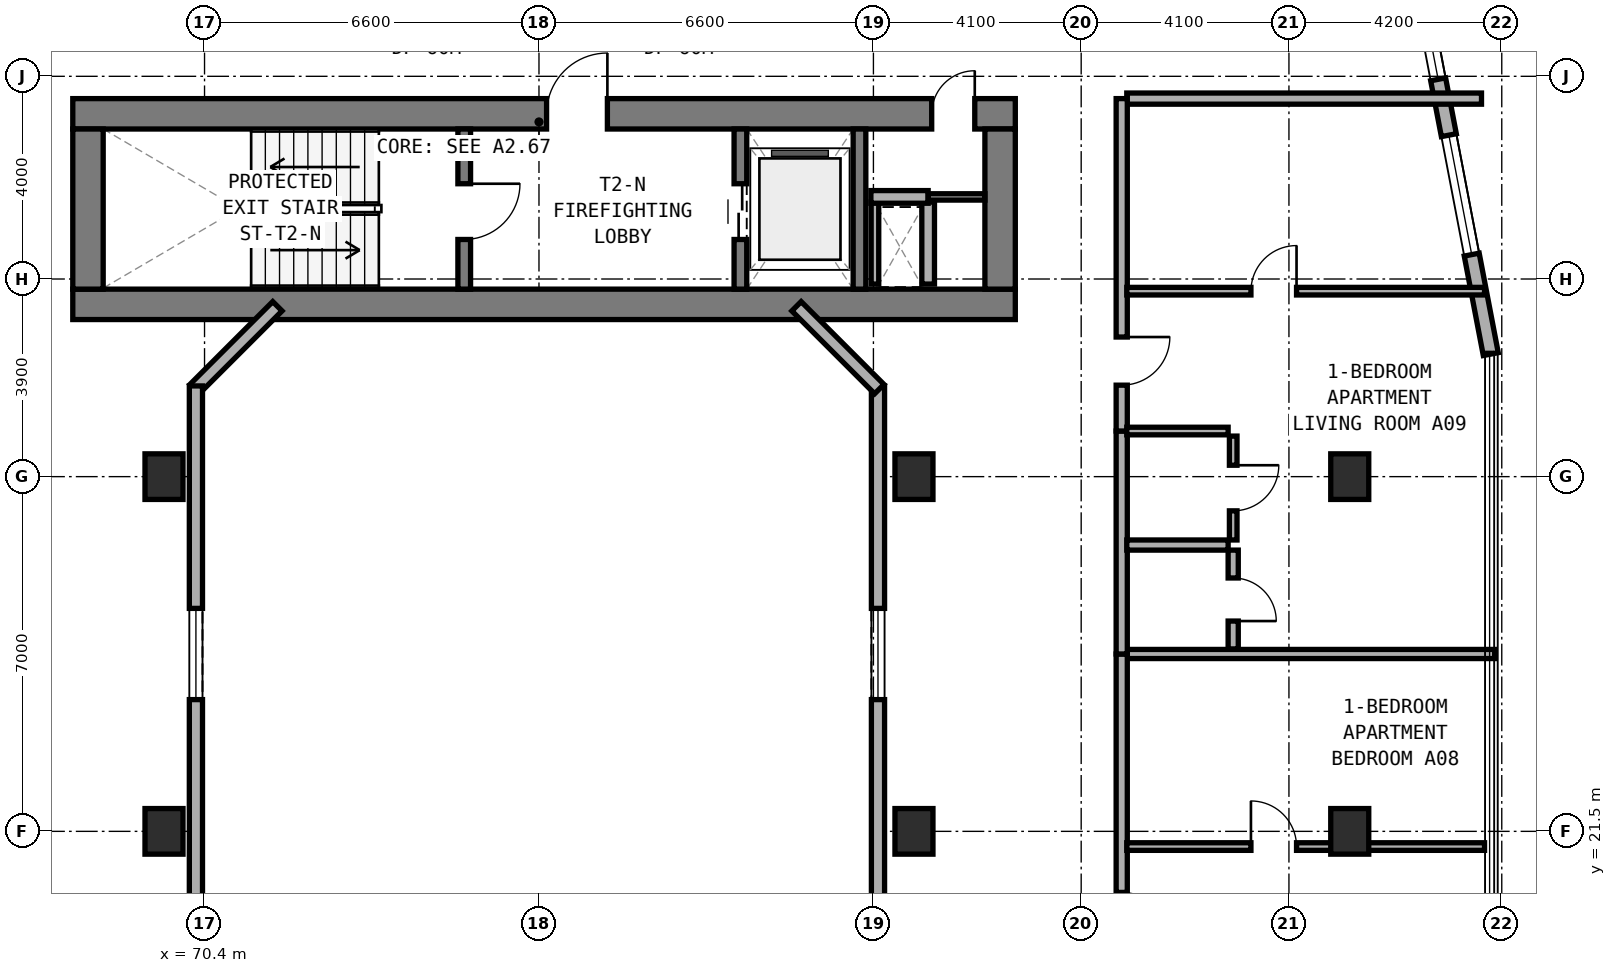
"""IFC4 building model, lengths in metres.
Left out: names, types, materials, properties, quantities, classifications, styles, units other than length and angle.
Written with IfcOpenShell. Run it as: python <this file> out.ifc"""

import sys

from ifc_helpers import new_model, si_unit, direction, frame, frame_2d, origin, origin_2d, place, context, subcontext, project, spatial, rectangle, extrude, element, fill, save


model = new_model("IFC4")
c1 = context("Model", 3, precision=1e-05, world=origin(), true_north=direction((0.0, 1.0)))
c2 = subcontext(c1, "Body", "Model", "MODEL_VIEW")
j1 = project(units=[si_unit("LENGTHUNIT", "METRE"), si_unit("PLANEANGLEUNIT", "RADIAN")], contexts=[c1])
p1 = place(None, origin())
s1 = spatial("IfcSite", under=j1, at=p1, CompositionType="ELEMENT")
p2 = place(p1, origin())
s2 = spatial("IfcBuilding", under=s1, at=p2, CompositionType="ELEMENT")
p3 = place(p2, frame((0.0, 0.0, 52.0)))
s3 = spatial("IfcBuildingStorey", under=s2, at=p3, CompositionType="ELEMENT", Elevation=52.0)
p4 = place(p3, frame((67.8, 31.9, 0.0), z_axis=(0.0, 0.0, 1.0), x_axis=(1.0, 0.0, 0.0)))
e1 = element("IfcWall", 1, at=p4, inside=s3, PredefinedType="SHEAR", context=c2, shape_type="SweptSolid", body=[
    extrude(rectangle(XDim=18.6, YDim=0.6, at=frame_2d((9.3, 0.0))), origin(), (0.0, 0.0, 1.0), 3.5),
])
p5 = place(p3, frame((67.8, 35.66, 0.0), z_axis=(0.0, 0.0, 1.0), x_axis=(1.0, 0.0, 0.0)))
e2 = element("IfcWall", 2, at=p5, inside=s3, PredefinedType="SHEAR", context=c2, shape_type="SweptSolid", body=[
    extrude(rectangle(XDim=18.6, YDim=0.6, at=frame_2d((9.3, 0.0))), origin(), (0.0, 0.0, 1.0), 3.5),
])
p6 = place(p5, frame((9.35, 0.0, 0.0)))
e3 = element("IfcOpeningElement", 3, at=p6, cuts=e2, PredefinedType="OPENING", context=c2, shape_type="SweptSolid", body=[
    extrude(rectangle(XDim=1.2, YDim=2.15, at=frame_2d((0.6, 1.075))), frame((0.0, 0.31, 0.0), z_axis=(0.0, -1.0, 0.0), x_axis=(1.0, 0.0, 0.0)), (0.0, 0.0, 1.0), 0.62),
])
p7 = place(p5, frame((16.95, 0.0, 0.0)))
e4 = element("IfcOpeningElement", 4, at=p7, cuts=e2, PredefinedType="OPENING", context=c2, shape_type="SweptSolid", body=[
    extrude(rectangle(XDim=0.85, YDim=2.1, at=frame_2d((0.425, 1.05))), frame((0.0, 0.31, 0.0), z_axis=(0.0, -1.0, 0.0), x_axis=(1.0, 0.0, 0.0)), (0.0, 0.0, 1.0), 0.62),
])
for number, where, z_axis, x_axis in (
    (5, (68.1, 32.2, 0.0), (0.0, 0.0, 1.0), (0.0, 1.0, 0.0)),
    (6, (86.1, 32.2, 0.0), (0.0, 0.0, 1.0), (0.0, 1.0, 0.0)),
):
    element("IfcWall", number, at=place(p3, frame(where, z_axis=z_axis, x_axis=x_axis)), inside=s3, PredefinedType="SHEAR", context=c2, shape_type="SweptSolid", body=[
        extrude(rectangle(XDim=3.16, YDim=0.6, at=frame_2d((1.58, 0.0))), origin(), (0.0, 0.0, 1.0), 3.5),
    ])
p8 = place(p3, frame((75.525, 32.2, 0.0), z_axis=(0.0, 0.0, 1.0), x_axis=(0.0, 1.0, 0.0)))
e7 = element("IfcWall", 7, at=p8, inside=s3, PredefinedType="STANDARD", context=c2, shape_type="SweptSolid", body=[
    extrude(rectangle(XDim=3.16, YDim=0.25, at=frame_2d((1.58, 0.0))), origin(), (0.0, 0.0, 1.0), 3.25),
])
p9 = place(p8, frame((0.98, 0.0, 0.0)))
e8 = element("IfcOpeningElement", 8, at=p9, cuts=e7, PredefinedType="OPENING", context=c2, shape_type="SweptSolid", body=[
    extrude(rectangle(XDim=1.1, YDim=2.15, at=frame_2d((0.55, 1.075))), frame((0.0, 0.135, 0.0), z_axis=(0.0, -1.0, 0.0), x_axis=(1.0, 0.0, 0.0)), (0.0, 0.0, 1.0), 0.27),
])
p10 = place(p3, frame((80.975, 32.2, 0.0), z_axis=(0.0, 0.0, 1.0), x_axis=(0.0, 1.0, 0.0)))
e9 = element("IfcWall", 9, at=p10, inside=s3, PredefinedType="STANDARD", context=c2, shape_type="SweptSolid", body=[
    extrude(rectangle(XDim=3.16, YDim=0.25, at=frame_2d((1.58, 0.0))), origin(), (0.0, 0.0, 1.0), 3.25),
])
p11 = place(p10, frame((0.98, 0.0, 0.0)))
e10 = element("IfcOpeningElement", 10, at=p11, cuts=e9, PredefinedType="OPENING", context=c2, shape_type="SweptSolid", body=[
    extrude(rectangle(XDim=1.1, YDim=2.15, at=frame_2d((0.55, 1.075))), frame((0.0, 0.135, 0.0), z_axis=(0.0, -1.0, 0.0), x_axis=(1.0, 0.0, 0.0)), (0.0, 0.0, 1.0), 0.27),
])
p12 = place(p3, frame((83.325, 32.2, 0.0), z_axis=(0.0, 0.0, 1.0), x_axis=(0.0, 1.0, 0.0)))
e11 = element("IfcWall", 11, at=p12, inside=s3, PredefinedType="STANDARD", context=c2, shape_type="SweptSolid", body=[
    extrude(rectangle(XDim=3.16, YDim=0.25, at=frame_2d((1.58, 0.0))), origin(), (0.0, 0.0, 1.0), 3.25),
])
for number, where, z_axis, x_axis in (
    (12, (93.0, 21.5, 0.0), (0.0, 0.0, 1.0), (1.0, 0.0, 0.0)),
    (13, (93.0, 28.5, 0.0), (0.0, 0.0, 1.0), (1.0, 0.0, 0.0)),
    (14, (69.6, 21.5, 0.0), (0.0, 0.0, 1.0), (1.0, 0.0, 0.0)),
    (15, (69.6, 28.5, 0.0), (0.0, 0.0, 1.0), (1.0, 0.0, 0.0)),
    (16, (84.4, 21.5, 0.0), (0.0, 0.0, 1.0), (1.0, 0.0, 0.0)),
    (17, (84.4, 28.5, 0.0), (0.0, 0.0, 1.0), (1.0, 0.0, 0.0)),
):
    element("IfcColumn", number, at=place(p3, frame(where, z_axis=z_axis, x_axis=x_axis)), inside=s3, PredefinedType="COLUMN", context=c2, shape_type="SweptSolid", body=[
        extrude(rectangle(XDim=0.75, YDim=0.9, at=origin_2d()), origin(), (0.0, 0.0, 1.0), 3.5),
    ])
p13 = place(p3, frame((95.783, 30.918, 0.0), z_axis=(0.0, 0.0, 1.0), x_axis=(-0.188087874316, 0.982152203854, 0.0)))
e18 = element("IfcWall", 18, at=p13, inside=s3, PredefinedType="STANDARD", context=c2, shape_type="SweptSolid", body=[
    extrude(rectangle(XDim=9.634, YDim=0.3, at=frame_2d((4.817, 0.0))), origin(), (0.0, 0.0, 1.0), 3.25),
])
p14 = place(p13, frame((1.999, 0.0, 0.8)))
e19 = element("IfcOpeningElement", 19, at=p14, cuts=e18, PredefinedType="OPENING", context=c2, shape_type="SweptSolid", body=[
    extrude(rectangle(XDim=2.4, YDim=1.6, at=frame_2d((1.2, 0.8))), frame((0.0, 0.16, 0.0), z_axis=(0.0, -1.0, 0.0), x_axis=(1.0, 0.0, 0.0)), (0.0, 0.0, 1.0), 0.32),
])
p15 = place(p13, frame((5.521, 0.0, 0.85)))
e20 = element("IfcOpeningElement", 20, at=p15, cuts=e18, PredefinedType="OPENING", context=c2, shape_type="SweptSolid", body=[
    extrude(rectangle(XDim=1.2, YDim=1.5, at=frame_2d((0.6, 0.75))), frame((0.0, 0.16, 0.0), z_axis=(0.0, -1.0, 0.0), x_axis=(1.0, 0.0, 0.0)), (0.0, 0.0, 1.0), 0.32),
])
p16 = place(p13, frame((7.682, 0.0, 0.85)))
e21 = element("IfcOpeningElement", 21, at=p16, cuts=e18, PredefinedType="OPENING", context=c2, shape_type="SweptSolid", body=[
    extrude(rectangle(XDim=1.5, YDim=1.5, at=frame_2d((0.75, 0.75))), frame((0.0, 0.16, 0.0), z_axis=(0.0, -1.0, 0.0), x_axis=(1.0, 0.0, 0.0)), (0.0, 0.0, 1.0), 0.32),
])
p17 = place(p3, frame((83.69, 19.71, 0.0), z_axis=(0.0, 0.0, 1.0), x_axis=(0.0, 1.0, 0.0)))
e22 = element("IfcWall", 22, at=p17, inside=s3, PredefinedType="STANDARD", context=c2, shape_type="SweptSolid", body=[
    extrude(rectangle(XDim=10.58, YDim=0.26, at=frame_2d((5.29, 0.0))), origin(), (0.0, 0.0, 1.0), 3.25),
])
p18 = place(p17, frame((4.39, 0.0, 0.85)))
e23 = element("IfcOpeningElement", 23, at=p18, cuts=e22, PredefinedType="OPENING", context=c2, shape_type="SweptSolid", body=[
    extrude(rectangle(XDim=1.8, YDim=1.5, at=frame_2d((0.9, 0.75))), frame((0.0, 0.14, 0.0), z_axis=(0.0, -1.0, 0.0), x_axis=(1.0, 0.0, 0.0)), (0.0, 0.0, 1.0), 0.28),
])
for number, where, z_axis, x_axis in (
    (24, (83.716, 30.228, 0.0), (0.0, 0.0, 1.0), (-0.707, 0.707, 0.0)),
    (25, (71.838, 31.862, 0.0), (0.0, 0.0, 1.0), (-0.707, -0.707, 0.0)),
):
    element("IfcWall", number, at=place(p3, frame(where, z_axis=z_axis, x_axis=x_axis)), inside=s3, PredefinedType="STANDARD", context=c2, shape_type="SweptSolid", body=[
        extrude(rectangle(XDim=2.311, YDim=0.26, at=frame_2d((1.155, 0.0))), origin(), (0.0, 0.0, 1.0), 3.25),
    ])
p19 = place(p3, frame((70.23, 30.29, 0.0), z_axis=(0.0, 0.0, 1.0), x_axis=(0.0, -1.0, 0.0)))
e26 = element("IfcWall", 26, at=p19, inside=s3, PredefinedType="STANDARD", context=c2, shape_type="SweptSolid", body=[
    extrude(rectangle(XDim=10.58, YDim=0.26, at=frame_2d((5.29, 0.0))), origin(), (0.0, 0.0, 1.0), 3.25),
])
p20 = place(p19, frame((4.39, 0.0, 0.85)))
e27 = element("IfcOpeningElement", 27, at=p20, cuts=e26, PredefinedType="OPENING", context=c2, shape_type="SweptSolid", body=[
    extrude(rectangle(XDim=1.8, YDim=1.5, at=frame_2d((0.9, 0.75))), frame((0.0, 0.14, 0.0), z_axis=(0.0, -1.0, 0.0), x_axis=(1.0, 0.0, 0.0)), (0.0, 0.0, 1.0), 0.28),
])
p21 = place(p3, frame((83.63, 32.3, 0.0), z_axis=(0.0, 0.0, 1.0), x_axis=(0.0, 1.0, 0.0)))
e28 = element("IfcWall", 28, at=p21, inside=s3, PredefinedType="PARTITIONING", context=c2, shape_type="SweptSolid", body=[
    extrude(rectangle(XDim=1.62, YDim=0.15, at=frame_2d((0.81, 0.0))), origin(), (0.0, 0.0, 1.0), 2.725),
])
p22 = place(p3, frame((84.68, 32.3, 0.0), z_axis=(0.0, 0.0, 1.0), x_axis=(0.0, 1.0, 0.0)))
e29 = element("IfcWall", 29, at=p22, inside=s3, PredefinedType="SOLIDWALL", context=c2, shape_type="SweptSolid", body=[
    extrude(rectangle(XDim=1.62, YDim=0.25, at=frame_2d((0.81, 0.0))), origin(), (0.0, 0.0, 1.0), 3.22),
])
p23 = place(p3, frame((83.55, 34.02, 0.0), z_axis=(0.0, 0.0, 1.0), x_axis=(1.0, 0.0, 0.0)))
e30 = element("IfcWall", 30, at=p23, inside=s3, PredefinedType="SOLIDWALL", context=c2, shape_type="SweptSolid", body=[
    extrude(rectangle(XDim=1.13, YDim=0.25, at=frame_2d((0.565, 0.0))), origin(), (0.0, 0.0, 1.0), 3.22),
])
p24 = place(p3, frame((84.68, 34.02, 0.0), z_axis=(0.0, 0.0, 1.0), x_axis=(1.0, 0.0, 0.0)))
e31 = element("IfcWall", 31, at=p24, inside=s3, PredefinedType="PARTITIONING", context=c2, shape_type="SweptSolid", body=[
    extrude(rectangle(XDim=1.12, YDim=0.125, at=frame_2d((0.56, 0.0))), origin(), (0.0, 0.0, 1.0), 3.22),
])
p25 = place(p3, frame((88.6, 35.96, 0.0), z_axis=(0.0, 0.0, 1.0), x_axis=(1.0, 0.0, 0.0)))
e32 = element("IfcWall", 32, at=p25, inside=s3, PredefinedType="SOLIDWALL", context=c2, shape_type="SweptSolid", body=[
    extrude(rectangle(XDim=7.0, YDim=0.22, at=frame_2d((3.5, 0.0))), origin(), (0.0, 0.0, 1.0), 2.865),
])
p26 = place(p3, frame((88.5, 25.0, 0.0), z_axis=(0.0, 0.0, 1.0), x_axis=(1.0, 0.0, 0.0)))
e33 = element("IfcWall", 33, at=p26, inside=s3, PredefinedType="SOLIDWALL", context=c2, shape_type="SweptSolid", body=[
    extrude(rectangle(XDim=7.36, YDim=0.18, at=frame_2d((3.68, 0.0))), origin(), (0.0, 0.0, 1.0), 2.865),
])
p27 = place(p3, frame((88.5, 18.44, 0.0), z_axis=(0.0, 0.0, 1.0), x_axis=(0.0, 1.0, 0.0)))
e34 = element("IfcWall", 34, at=p27, inside=s3, PredefinedType="SOLIDWALL", context=c2, shape_type="SweptSolid", body=[
    extrude(rectangle(XDim=6.56, YDim=0.22, at=frame_2d((3.28, 0.0))), origin(), (0.0, 0.0, 1.0), 2.725),
])
p28 = place(p27, frame((0.905, 0.0, 0.0)))
e35 = element("IfcOpeningElement", 35, at=p28, cuts=e34, PredefinedType="OPENING", context=c2, shape_type="SweptSolid", body=[
    extrude(rectangle(XDim=0.95, YDim=2.1, at=frame_2d((0.475, 1.05))), frame((0.0, 0.12, 0.0), z_axis=(0.0, -1.0, 0.0), x_axis=(1.0, 0.0, 0.0)), (0.0, 0.0, 1.0), 0.24),
])
p29 = place(p3, frame((88.6, 21.2, 0.0), z_axis=(0.0, 0.0, 1.0), x_axis=(1.0, 0.0, 0.0)))
e36 = element("IfcWall", 36, at=p29, inside=s3, PredefinedType="PARTITIONING", context=c2, shape_type="SweptSolid", body=[
    extrude(rectangle(XDim=7.06, YDim=0.15, at=frame_2d((3.53, 0.0))), origin(), (0.0, 0.0, 1.0), 2.865),
])
p30 = place(p29, frame((2.45, 0.0, 0.0)))
e37 = element("IfcOpeningElement", 37, at=p30, cuts=e36, PredefinedType="OPENING", context=c2, shape_type="SweptSolid", body=[
    extrude(rectangle(XDim=0.9, YDim=2.1, at=frame_2d((0.45, 1.05))), frame((0.0, 0.085, 0.0), z_axis=(0.0, -1.0, 0.0), x_axis=(1.0, 0.0, 0.0)), (0.0, 0.0, 1.0), 0.17),
])
p31 = place(p3, frame((88.5, 25.0, 0.0), z_axis=(0.0, 0.0, 1.0), x_axis=(0.0, 1.0, 0.0)))
e38 = element("IfcWall", 38, at=p31, inside=s3, PredefinedType="SOLIDWALL", context=c2, shape_type="SweptSolid", body=[
    extrude(rectangle(XDim=4.4, YDim=0.22, at=frame_2d((2.2, 0.0))), origin(), (0.0, 0.0, 1.0), 2.725),
])
p32 = place(p3, frame((88.5, 29.4, 0.0), z_axis=(0.0, 0.0, 1.0), x_axis=(0.0, 1.0, 0.0)))
e39 = element("IfcWall", 39, at=p32, inside=s3, PredefinedType="SOLIDWALL", context=c2, shape_type="SweptSolid", body=[
    extrude(rectangle(XDim=6.56, YDim=0.22, at=frame_2d((3.28, 0.0))), origin(), (0.0, 0.0, 1.0), 3.22),
])
p33 = place(p32, frame((0.905, 0.0, 0.0)))
e40 = element("IfcOpeningElement", 40, at=p33, cuts=e39, PredefinedType="OPENING", context=c2, shape_type="SweptSolid", body=[
    extrude(rectangle(XDim=0.95, YDim=2.1, at=frame_2d((0.475, 1.05))), frame((0.0, 0.12, 0.0), z_axis=(0.0, -1.0, 0.0), x_axis=(1.0, 0.0, 0.0)), (0.0, 0.0, 1.0), 0.24),
])
p34 = place(p3, frame((88.6, 32.16, 0.0), z_axis=(0.0, 0.0, 1.0), x_axis=(1.0, 0.0, 0.0)))
e41 = element("IfcWall", 41, at=p34, inside=s3, PredefinedType="PARTITIONING", context=c2, shape_type="SweptSolid", body=[
    extrude(rectangle(XDim=7.06, YDim=0.15, at=frame_2d((3.53, 0.0))), origin(), (0.0, 0.0, 1.0), 2.865),
])
p35 = place(p34, frame((2.45, 0.0, 0.0)))
e42 = element("IfcOpeningElement", 42, at=p35, cuts=e41, PredefinedType="OPENING", context=c2, shape_type="SweptSolid", body=[
    extrude(rectangle(XDim=0.9, YDim=2.1, at=frame_2d((0.45, 1.05))), frame((0.0, 0.085, 0.0), z_axis=(0.0, -1.0, 0.0), x_axis=(1.0, 0.0, 0.0)), (0.0, 0.0, 1.0), 0.17),
])
p36 = place(p3, frame((88.6, 27.15, 0.0), z_axis=(0.0, 0.0, 1.0), x_axis=(1.0, 0.0, 0.0)))
e43 = element("IfcWall", 43, at=p36, inside=s3, PredefinedType="PLUMBINGWALL", context=c2, shape_type="SweptSolid", body=[
    extrude(rectangle(XDim=2.0, YDim=0.2, at=frame_2d((1.0, 0.0))), origin(), (0.0, 0.0, 1.0), 3.22),
])
p37 = place(p3, frame((88.6, 29.4, 0.0), z_axis=(0.0, 0.0, 1.0), x_axis=(1.0, 0.0, 0.0)))
e44 = element("IfcWall", 44, at=p37, inside=s3, PredefinedType="PARTITIONING", context=c2, shape_type="SweptSolid", body=[
    extrude(rectangle(XDim=2.0, YDim=0.15, at=frame_2d((1.0, 0.0))), origin(), (0.0, 0.0, 1.0), 3.22),
])
p38 = place(p3, frame((90.7, 25.1, 0.0), z_axis=(0.0, 0.0, 1.0), x_axis=(0.0, 1.0, 0.0)))
e45 = element("IfcWall", 45, at=p38, inside=s3, PredefinedType="PLUMBINGWALL", context=c2, shape_type="SweptSolid", body=[
    extrude(rectangle(XDim=1.95, YDim=0.2, at=frame_2d((0.975, 0.0))), origin(), (0.0, 0.0, 1.0), 3.22),
])
p39 = place(p38, frame((0.55, 0.0, 0.0)))
e46 = element("IfcOpeningElement", 46, at=p39, cuts=e45, PredefinedType="OPENING", context=c2, shape_type="SweptSolid", body=[
    extrude(rectangle(XDim=0.85, YDim=2.1, at=frame_2d((0.425, 1.05))), frame((0.0, 0.11, 0.0), z_axis=(0.0, -1.0, 0.0), x_axis=(1.0, 0.0, 0.0)), (0.0, 0.0, 1.0), 0.22),
])
p40 = place(p3, frame((90.7, 27.25, 0.0), z_axis=(0.0, 0.0, 1.0), x_axis=(0.0, 1.0, 0.0)))
e47 = element("IfcWall", 47, at=p40, inside=s3, PredefinedType="PARTITIONING", context=c2, shape_type="SweptSolid", body=[
    extrude(rectangle(XDim=2.05, YDim=0.15, at=frame_2d((1.025, 0.0))), origin(), (0.0, 0.0, 1.0), 2.725),
])
p41 = place(p40, frame((0.575, 0.0, 0.0)))
e48 = element("IfcOpeningElement", 48, at=p41, cuts=e47, PredefinedType="OPENING", context=c2, shape_type="SweptSolid", body=[
    extrude(rectangle(XDim=0.9, YDim=2.1, at=frame_2d((0.45, 1.05))), frame((0.0, 0.085, 0.0), z_axis=(0.0, -1.0, 0.0), x_axis=(1.0, 0.0, 0.0)), (0.0, 0.0, 1.0), 0.17),
])
p42 = place(p14, origin())
e49 = element("IfcWindow", 49, at=p42, inside=s3, PartitioningType="SINGLE_PANEL", PredefinedType="WINDOW", context=c2, shape_type="SweptSolid", body=[
    extrude(rectangle(XDim=2.4, YDim=1.6, at=frame_2d((1.2, 0.8))), frame((0.0, 0.03, 0.0), z_axis=(0.0, -1.0, 0.0), x_axis=(1.0, 0.0, 0.0)), (0.0, 0.0, 1.0), 0.06),
])
fill(e19, e49)
p43 = place(p15, origin())
e50 = element("IfcWindow", 50, at=p43, inside=s3, PartitioningType="SINGLE_PANEL", PredefinedType="WINDOW", context=c2, shape_type="SweptSolid", body=[
    extrude(rectangle(XDim=1.2, YDim=1.5, at=frame_2d((0.6, 0.75))), frame((0.0, 0.03, 0.0), z_axis=(0.0, -1.0, 0.0), x_axis=(1.0, 0.0, 0.0)), (0.0, 0.0, 1.0), 0.06),
])
fill(e20, e50)
p44 = place(p18, origin())
e51 = element("IfcWindow", 51, at=p44, inside=s3, PartitioningType="SINGLE_PANEL", PredefinedType="WINDOW", context=c2, shape_type="SweptSolid", body=[
    extrude(rectangle(XDim=1.8, YDim=1.5, at=frame_2d((0.9, 0.75))), frame((0.0, 0.03, 0.0), z_axis=(0.0, -1.0, 0.0), x_axis=(1.0, 0.0, 0.0)), (0.0, 0.0, 1.0), 0.06),
])
fill(e23, e51)
p45 = place(p20, origin())
e52 = element("IfcWindow", 52, at=p45, inside=s3, PartitioningType="SINGLE_PANEL", PredefinedType="WINDOW", context=c2, shape_type="SweptSolid", body=[
    extrude(rectangle(XDim=1.8, YDim=1.5, at=frame_2d((0.9, 0.75))), frame((0.0, 0.03, 0.0), z_axis=(0.0, -1.0, 0.0), x_axis=(1.0, 0.0, 0.0)), (0.0, 0.0, 1.0), 0.06),
])
fill(e27, e52)
p46 = place(p9, frame((1.1, 0.0, 0.0), z_axis=(0.0, 0.0, 1.0), x_axis=(-1.0, 0.0, 0.0)))
e53 = element("IfcDoor", 53, at=p46, inside=s3, OperationType="SINGLE_SWING_LEFT", PredefinedType="DOOR", context=c2, shape_type="SweptSolid", body=[
    extrude(rectangle(XDim=1.1, YDim=2.15, at=frame_2d((0.55, 1.075))), frame((0.0, 0.025, 0.0), z_axis=(0.0, -1.0, 0.0), x_axis=(1.0, 0.0, 0.0)), (0.0, 0.0, 1.0), 0.05),
])
fill(e8, e53)
p47 = place(p6, origin())
e54 = element("IfcDoor", 54, at=p47, inside=s3, OperationType="SINGLE_SWING_RIGHT", PredefinedType="DOOR", context=c2, shape_type="SweptSolid", body=[
    extrude(rectangle(XDim=1.2, YDim=2.15, at=frame_2d((0.6, 1.075))), frame((0.0, 0.025, 0.0), z_axis=(0.0, -1.0, 0.0), x_axis=(1.0, 0.0, 0.0)), (0.0, 0.0, 1.0), 0.05),
])
fill(e3, e54)
p48 = place(p11, origin())
e55 = element("IfcDoor", 55, at=p48, inside=s3, OperationType="DOUBLE_DOOR_SLIDING", PredefinedType="DOOR", context=c2, shape_type="SweptSolid", body=[
    extrude(rectangle(XDim=1.1, YDim=2.15, at=frame_2d((0.55, 1.075))), frame((0.0, 0.025, 0.0), z_axis=(0.0, -1.0, 0.0), x_axis=(1.0, 0.0, 0.0)), (0.0, 0.0, 1.0), 0.05),
])
fill(e10, e55)
p49 = place(p7, origin())
e56 = element("IfcDoor", 56, at=p49, inside=s3, OperationType="SINGLE_SWING_RIGHT", PredefinedType="DOOR", context=c2, shape_type="SweptSolid", body=[
    extrude(rectangle(XDim=0.85, YDim=2.1, at=frame_2d((0.425, 1.05))), frame((0.0, 0.025, 0.0), z_axis=(0.0, -1.0, 0.0), x_axis=(1.0, 0.0, 0.0)), (0.0, 0.0, 1.0), 0.05),
])
fill(e4, e56)
p50 = place(p28, frame((0.95, 0.0, 0.0), z_axis=(0.0, 0.0, 1.0), x_axis=(-1.0, 0.0, 0.0)))
e57 = element("IfcDoor", 57, at=p50, inside=s3, OperationType="SINGLE_SWING_RIGHT", PredefinedType="DOOR", context=c2, shape_type="SweptSolid", body=[
    extrude(rectangle(XDim=0.95, YDim=2.1, at=frame_2d((0.475, 1.05))), frame((0.0, 0.025, 0.0), z_axis=(0.0, -1.0, 0.0), x_axis=(1.0, 0.0, 0.0)), (0.0, 0.0, 1.0), 0.05),
])
fill(e35, e57)
p51 = place(p30, origin())
e58 = element("IfcDoor", 58, at=p51, inside=s3, OperationType="SINGLE_SWING_LEFT", PredefinedType="DOOR", context=c2, shape_type="SweptSolid", body=[
    extrude(rectangle(XDim=0.9, YDim=2.1, at=frame_2d((0.45, 1.05))), frame((0.0, 0.025, 0.0), z_axis=(0.0, -1.0, 0.0), x_axis=(1.0, 0.0, 0.0)), (0.0, 0.0, 1.0), 0.05),
])
fill(e37, e58)
p52 = place(p33, frame((0.95, 0.0, 0.0), z_axis=(0.0, 0.0, 1.0), x_axis=(-1.0, 0.0, 0.0)))
e59 = element("IfcDoor", 59, at=p52, inside=s3, OperationType="SINGLE_SWING_LEFT", PredefinedType="DOOR", context=c2, shape_type="SweptSolid", body=[
    extrude(rectangle(XDim=0.95, YDim=2.1, at=frame_2d((0.475, 1.05))), frame((0.0, 0.025, 0.0), z_axis=(0.0, -1.0, 0.0), x_axis=(1.0, 0.0, 0.0)), (0.0, 0.0, 1.0), 0.05),
])
fill(e40, e59)
p53 = place(p35, origin())
e60 = element("IfcDoor", 60, at=p53, inside=s3, OperationType="SINGLE_SWING_RIGHT", PredefinedType="DOOR", context=c2, shape_type="SweptSolid", body=[
    extrude(rectangle(XDim=0.9, YDim=2.1, at=frame_2d((0.45, 1.05))), frame((0.0, 0.025, 0.0), z_axis=(0.0, -1.0, 0.0), x_axis=(1.0, 0.0, 0.0)), (0.0, 0.0, 1.0), 0.05),
])
fill(e42, e60)
p54 = place(p39, frame((0.85, 0.0, 0.0), z_axis=(0.0, 0.0, 1.0), x_axis=(-1.0, 0.0, 0.0)))
e61 = element("IfcDoor", 61, at=p54, inside=s3, OperationType="SINGLE_SWING_RIGHT", PredefinedType="DOOR", context=c2, shape_type="SweptSolid", body=[
    extrude(rectangle(XDim=0.85, YDim=2.1, at=frame_2d((0.425, 1.05))), frame((0.0, 0.025, 0.0), z_axis=(0.0, -1.0, 0.0), x_axis=(1.0, 0.0, 0.0)), (0.0, 0.0, 1.0), 0.05),
])
fill(e46, e61)
p55 = place(p41, frame((0.9, 0.0, 0.0), z_axis=(0.0, 0.0, 1.0), x_axis=(-1.0, 0.0, 0.0)))
e62 = element("IfcDoor", 62, at=p55, inside=s3, OperationType="SINGLE_SWING_LEFT", PredefinedType="DOOR", context=c2, shape_type="SweptSolid", body=[
    extrude(rectangle(XDim=0.9, YDim=2.1, at=frame_2d((0.45, 1.05))), frame((0.0, 0.025, 0.0), z_axis=(0.0, -1.0, 0.0), x_axis=(1.0, 0.0, 0.0)), (0.0, 0.0, 1.0), 0.05),
])
fill(e48, e62)
save(model, sys.argv[1])
